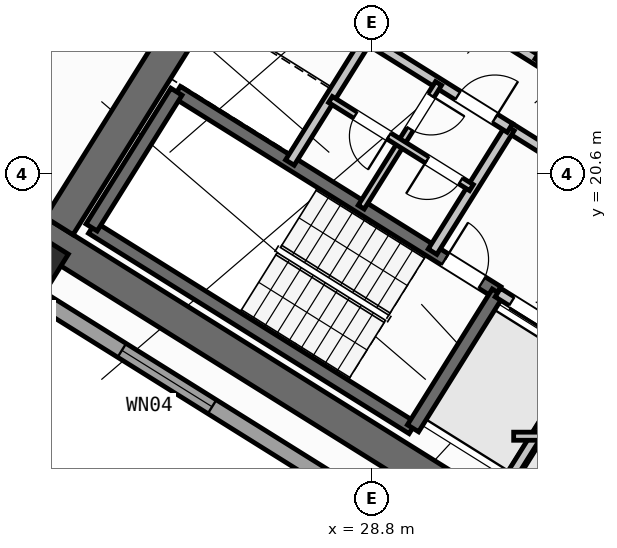
"""IFC4 building model, lengths in metres.
Left out: names, types, materials, properties, quantities, classifications, styles, units other than length and angle.
Written with IfcOpenShell. Run it as: python <this file> out.ifc"""

import sys

from ifc_helpers import new_model, si_unit, direction, frame, frame_2d, origin, origin_2d, place, context, subcontext, project, spatial, rectangle, hollow_rectangle, extrude, source, transform, mapped, element, fill, save


model = new_model("IFC4")
c1 = context("Model", 3, precision=1e-05, world=origin(), true_north=direction((0.0, 1.0)))
c2 = subcontext(c1, "Body", "Model", "MODEL_VIEW")
j1 = project(units=[si_unit("LENGTHUNIT", "METRE"), si_unit("PLANEANGLEUNIT", "RADIAN")], contexts=[c1])
p1 = place(None, origin())
s1 = spatial("IfcSite", under=j1, at=p1, CompositionType="ELEMENT")
p2 = place(p1, origin())
s2 = spatial("IfcBuilding", under=s1, at=p2, CompositionType="ELEMENT")
p3 = place(p2, frame((0.0, 0.0, 97.2)))
s3 = spatial("IfcBuildingStorey", under=s2, at=p3, CompositionType="ELEMENT", Elevation=97.2)
p4 = place(p3, frame((33.409, 12.45, 0.0), z_axis=(0.0, 0.0, 1.0), x_axis=(-0.848051132073, 0.529914405721, 0.0)))
e1 = element("IfcWall", 1, at=p4, inside=s3, PredefinedType="SHEAR", context=c2, shape_type="SweptSolid", body=[
    extrude(rectangle(XDim=13.24, YDim=0.65, at=frame_2d((6.62, 0.0))), origin(), (0.0, 0.0, 1.0), 3.32),
])
p5 = place(p3, frame((26.007, 24.976, 0.0), z_axis=(0.0, 0.0, 1.0), x_axis=(-0.529916319127, -0.848049936456, 0.0)))
e2 = element("IfcWall", 2, at=p5, inside=s3, PredefinedType="SHEAR", context=c2, shape_type="SweptSolid", body=[
    extrude(rectangle(XDim=6.375, YDim=0.65, at=frame_2d((3.188, 0.0))), origin(), (0.0, 0.0, 1.0), 3.32),
])
m1 = source(origin(), c2, "Body", "SweptSolid", [
    extrude(hollow_rectangle(XDim=0.9, YDim=0.9, WallThickness=0.036, at=origin_2d()), origin(), (0.0, 0.0, 1.0), 3.6),
])
p6 = place(p3, frame((22.191, 18.87, 0.0), z_axis=(0.0, 0.0, 1.0), x_axis=(-0.848048096156, 0.529919264233, 0.0)))
e3 = element("IfcColumn", 3, at=p6, inside=s3, PredefinedType="COLUMN", context=c2, shape_type="MappedRepresentation", body=[
    mapped(m1, transform((0.0, 0.0, 0.0), scale=1.0)),
])
p7 = place(p3, frame((31.76, 12.183, 0.0), z_axis=(0.0, 0.0, 1.0), x_axis=(-0.848047074256, 0.529920899612, 0.0)))
e4 = element("IfcWall", 4, at=p7, inside=s3, PredefinedType="STANDARD", context=c2, shape_type="SweptSolid", body=[
    extrude(rectangle(XDim=30.652, YDim=0.32, at=frame_2d((15.326, 0.0))), origin(), (0.0, 0.0, 1.0), 3.32),
])
p8 = place(p7, frame((15.153, 0.0, 0.0)))
e5 = element("IfcOpeningElement", 5, at=p8, cuts=e4, PredefinedType="OPENING", context=c2, shape_type="SweptSolid", body=[
    extrude(rectangle(XDim=1.2, YDim=2.15, at=frame_2d((0.6, 1.075))), frame((0.0, 0.17, 0.0), z_axis=(0.0, -1.0, 0.0), x_axis=(1.0, 0.0, 0.0)), (0.0, 0.0, 1.0), 0.34),
])
p9 = place(p7, frame((2.002, 0.0, 0.8)))
e6 = element("IfcOpeningElement", 6, at=p9, cuts=e4, PredefinedType="OPENING", context=c2, shape_type="SweptSolid", body=[
    extrude(rectangle(XDim=2.1, YDim=1.55, at=frame_2d((1.05, 0.775))), frame((0.0, 0.17, 0.0), z_axis=(0.0, -1.0, 0.0), x_axis=(1.0, 0.0, 0.0)), (0.0, 0.0, 1.0), 0.34),
])
p10 = place(p7, frame((7.206, 0.0, 0.8)))
e7 = element("IfcOpeningElement", 7, at=p10, cuts=e4, PredefinedType="OPENING", context=c2, shape_type="SweptSolid", body=[
    extrude(rectangle(XDim=2.1, YDim=1.55, at=frame_2d((1.05, 0.775))), frame((0.0, 0.17, 0.0), z_axis=(0.0, -1.0, 0.0), x_axis=(1.0, 0.0, 0.0)), (0.0, 0.0, 1.0), 0.34),
])
p11 = place(p7, frame((12.648, 0.0, 1.0)))
e8 = element("IfcOpeningElement", 8, at=p11, cuts=e4, PredefinedType="OPENING", context=c2, shape_type="SweptSolid", body=[
    extrude(rectangle(XDim=0.9, YDim=1.25, at=frame_2d((0.45, 0.625))), frame((0.0, 0.17, 0.0), z_axis=(0.0, -1.0, 0.0), x_axis=(1.0, 0.0, 0.0)), (0.0, 0.0, 1.0), 0.34),
])
p12 = place(p7, frame((27.974, 0.0, 0.95)))
e9 = element("IfcOpeningElement", 9, at=p12, cuts=e4, PredefinedType="OPENING", context=c2, shape_type="SweptSolid", body=[
    extrude(rectangle(XDim=1.2, YDim=1.4, at=frame_2d((0.6, 0.7))), frame((0.0, 0.17, 0.0), z_axis=(0.0, -1.0, 0.0), x_axis=(1.0, 0.0, 0.0)), (0.0, 0.0, 1.0), 0.34),
])
p13 = place(p7, frame((18.347, 0.0, 1.0)))
e10 = element("IfcOpeningElement", 10, at=p13, cuts=e4, PredefinedType="OPENING", context=c2, shape_type="SweptSolid", body=[
    extrude(rectangle(XDim=0.9, YDim=1.25, at=frame_2d((0.45, 0.625))), frame((0.0, 0.17, 0.0), z_axis=(0.0, -1.0, 0.0), x_axis=(1.0, 0.0, 0.0)), (0.0, 0.0, 1.0), 0.34),
])
p14 = place(p7, frame((20.931, 0.0, 1.0)))
e11 = element("IfcOpeningElement", 11, at=p14, cuts=e4, PredefinedType="OPENING", context=c2, shape_type="SweptSolid", body=[
    extrude(rectangle(XDim=0.65, YDim=1.15, at=frame_2d((0.325, 0.575))), frame((0.0, 0.17, 0.0), z_axis=(0.0, -1.0, 0.0), x_axis=(1.0, 0.0, 0.0)), (0.0, 0.0, 1.0), 0.34),
])
p15 = place(p7, frame((22.938, 0.0, 1.0)))
e12 = element("IfcOpeningElement", 12, at=p15, cuts=e4, PredefinedType="OPENING", context=c2, shape_type="SweptSolid", body=[
    extrude(rectangle(XDim=0.9, YDim=1.25, at=frame_2d((0.45, 0.625))), frame((0.0, 0.17, 0.0), z_axis=(0.0, -1.0, 0.0), x_axis=(1.0, 0.0, 0.0)), (0.0, 0.0, 1.0), 0.34),
])
p16 = place(p7, frame((25.069, 0.0, 1.0)))
e13 = element("IfcOpeningElement", 13, at=p16, cuts=e4, PredefinedType="OPENING", context=c2, shape_type="SweptSolid", body=[
    extrude(rectangle(XDim=0.9, YDim=1.25, at=frame_2d((0.45, 0.625))), frame((0.0, 0.17, 0.0), z_axis=(0.0, -1.0, 0.0), x_axis=(1.0, 0.0, 0.0)), (0.0, 0.0, 1.0), 0.34),
])
p17 = place(p3, frame((29.605, 15.581, 0.0), z_axis=(0.0, 0.0, 1.0), x_axis=(-0.848036911448, 0.529937163087, 0.0)))
e14 = element("IfcWall", 14, at=p17, inside=s3, PredefinedType="SHEAR", context=c2, shape_type="SweptSolid", body=[
    extrude(rectangle(XDim=7.46, YDim=0.26, at=frame_2d((3.73, 0.0))), origin(), (0.0, 0.0, 1.0), 3.32),
])
p18 = place(p3, frame((31.28, 18.261, 0.0), z_axis=(0.0, 0.0, 1.0), x_axis=(-0.848051618787, 0.529913626805, 0.0)))
e15 = element("IfcWall", 15, at=p18, inside=s3, PredefinedType="SHEAR", context=c2, shape_type="SweptSolid", body=[
    extrude(rectangle(XDim=7.46, YDim=0.26, at=frame_2d((3.73, 0.0))), origin(), (0.0, 0.0, 1.0), 3.32),
])
p19 = place(p18, frame((0.36, 0.0, 0.0)))
e16 = element("IfcOpeningElement", 16, at=p19, cuts=e15, PredefinedType="OPENING", context=c2, shape_type="SweptSolid", body=[
    extrude(rectangle(XDim=0.86, YDim=2.05, at=frame_2d((0.43, 1.025))), frame((0.0, 0.14, 0.0), z_axis=(0.0, -1.0, 0.0), x_axis=(1.0, 0.0, 0.0)), (0.0, 0.0, 1.0), 0.28),
])
p20 = place(p3, frame((31.288, 18.256, 0.0), z_axis=(0.0, 0.0, 1.0), x_axis=(-0.529943379326, -0.848033026897, 0.0)))
e17 = element("IfcWall", 17, at=p20, inside=s3, PredefinedType="SHEAR", context=c2, shape_type="SweptSolid", body=[
    extrude(rectangle(XDim=3.16, YDim=0.26, at=frame_2d((1.58, 0.0))), origin(), (0.0, 0.0, 1.0), 3.32),
])
p21 = place(p3, frame((24.945, 22.22, 0.0), z_axis=(0.0, 0.0, 1.0), x_axis=(-0.529908658664, -0.84805472316, 0.0)))
e18 = element("IfcWall", 18, at=p21, inside=s3, PredefinedType="SHEAR", context=c2, shape_type="SweptSolid", body=[
    extrude(rectangle(XDim=3.16, YDim=0.26, at=frame_2d((1.58, 0.0))), origin(), (0.0, 0.0, 1.0), 3.32),
])
p22 = place(p3, frame((38.046, 21.108, 0.0), z_axis=(0.0, 0.0, 1.0), x_axis=(-0.848054434086, 0.529909121291, 0.0)))
e19 = element("IfcWall", 19, at=p22, inside=s3, PredefinedType="SHEAR", context=c2, shape_type="SweptSolid", body=[
    extrude(rectangle(XDim=7.33, YDim=0.26, at=frame_2d((3.665, 0.0))), origin(), (0.0, 0.0, 1.0), 3.32),
])
p23 = place(p22, frame((0.22, 0.0, 0.0)))
e20 = element("IfcOpeningElement", 20, at=p23, cuts=e19, PredefinedType="OPENING", context=c2, shape_type="SweptSolid", body=[
    extrude(rectangle(XDim=1.1, YDim=2.1, at=frame_2d((0.55, 1.05))), frame((0.0, 0.14, 0.0), z_axis=(0.0, -1.0, 0.0), x_axis=(1.0, 0.0, 0.0)), (0.0, 0.0, 1.0), 0.28),
])
p24 = place(p3, frame((34.848, 16.031, 0.0), z_axis=(0.0, 0.0, 1.0), x_axis=(-0.848044042236, 0.529925751807, 0.0)))
e21 = element("IfcWall", 21, at=p24, inside=s3, PredefinedType="STANDARD", context=c2, shape_type="SweptSolid", body=[
    extrude(rectangle(XDim=4.198, YDim=0.2, at=frame_2d((2.099, 0.0))), origin(), (0.0, 0.0, 1.0), 3.31),
])
p25 = place(p24, frame((0.348, 0.0, 0.0)))
e22 = element("IfcOpeningElement", 22, at=p25, cuts=e21, PredefinedType="OPENING", context=c2, shape_type="SweptSolid", body=[
    extrude(rectangle(XDim=1.3, YDim=2.2, at=frame_2d((0.65, 1.1))), frame((0.0, 0.11, 0.0), z_axis=(0.0, -1.0, 0.0), x_axis=(1.0, 0.0, 0.0)), (0.0, 0.0, 1.0), 0.22),
])
p26 = place(p24, frame((2.423, 0.0, 0.0)))
e23 = element("IfcOpeningElement", 23, at=p26, cuts=e21, PredefinedType="OPENING", context=c2, shape_type="SweptSolid", body=[
    extrude(rectangle(XDim=1.45, YDim=2.25, at=frame_2d((0.725, 1.125))), frame((0.0, 0.11, 0.0), z_axis=(0.0, -1.0, 0.0), x_axis=(1.0, 0.0, 0.0)), (0.0, 0.0, 1.0), 0.22),
])
p27 = place(p3, frame((36.374, 18.474, 0.0), z_axis=(0.0, 0.0, 1.0), x_axis=(-0.848051071577, 0.529914502535, 0.0)))
e24 = element("IfcWall", 24, at=p27, inside=s3, PredefinedType="STANDARD", context=c2, shape_type="SweptSolid", body=[
    extrude(rectangle(XDim=5.718, YDim=0.2, at=frame_2d((2.859, 0.0))), origin(), (0.0, 0.0, 1.0), 3.31),
])
p28 = place(p27, frame((2.498, 0.0, 0.0)))
e25 = element("IfcOpeningElement", 25, at=p28, cuts=e24, PredefinedType="OPENING", context=c2, shape_type="SweptSolid", body=[
    extrude(rectangle(XDim=1.15, YDim=2.1, at=frame_2d((0.575, 1.05))), frame((0.0, 0.11, 0.0), z_axis=(0.0, -1.0, 0.0), x_axis=(1.0, 0.0, 0.0)), (0.0, 0.0, 1.0), 0.22),
])
p29 = place(p3, frame((32.108, 22.814, 0.0), z_axis=(0.0, 0.0, 1.0), x_axis=(-0.848042229521, 0.529928652696, 0.0)))
e26 = element("IfcWall", 26, at=p29, inside=s3, PredefinedType="STANDARD", context=c2, shape_type="SweptSolid", body=[
    extrude(rectangle(XDim=5.62, YDim=0.2, at=frame_2d((2.81, 0.0))), origin(), (0.0, 0.0, 1.0), 3.31),
])
p30 = place(p3, frame((32.982, 24.213, 0.0), z_axis=(0.0, 0.0, 1.0), x_axis=(-0.529839334948, -0.84809803628, 0.0)))
e27 = element("IfcWall", 27, at=p30, inside=s3, PredefinedType="STANDARD", context=c2, shape_type="SweptSolid", body=[
    extrude(rectangle(XDim=1.65, YDim=0.2, at=frame_2d((0.825, 0.0))), origin(), (0.0, 0.0, 1.0), 3.31),
])
p31 = place(p3, frame((33.029, 17.003, 0.0), z_axis=(0.0, 0.0, 1.0), x_axis=(-0.529916267533, -0.848049968695, 0.0)))
e28 = element("IfcWall", 28, at=p31, inside=s3, PredefinedType="STANDARD", context=c2, shape_type="SweptSolid", body=[
    extrude(rectangle(XDim=2.92, YDim=0.2, at=frame_2d((1.46, 0.0))), origin(), (0.0, 0.0, 1.0), 3.31),
])
for number, where, z_axis, x_axis in (
    (29, (31.525, 21.504, 0.0), (0.0, 0.0, 1.0), (-0.53, -0.848, 0.0)),
    (30, (28.71, 23.263, 0.0), (0.0, 0.0, 1.0), (-0.53, -0.848, 0.0)),
):
    element("IfcWall", number, at=place(p3, frame(where, z_axis=z_axis, x_axis=x_axis)), inside=s3, PredefinedType="STANDARD", context=c2, shape_type="SweptSolid", body=[
        extrude(rectangle(XDim=2.88, YDim=0.2, at=frame_2d((1.44, 0.0))), origin(), (0.0, 0.0, 1.0), 3.31),
    ])
p32 = place(p3, frame((31.525, 21.504, 0.0), z_axis=(0.0, 0.0, 1.0), x_axis=(-0.848044998614, 0.529924221305, 0.0)))
e31 = element("IfcWall", 31, at=p32, inside=s3, PredefinedType="STANDARD", context=c2, shape_type="SweptSolid", body=[
    extrude(rectangle(XDim=6.168, YDim=0.2, at=frame_2d((3.084, 0.0))), origin(), (0.0, 0.0, 1.0), 3.31),
])
p33 = place(p32, frame((4.4, 0.0, 0.0)))
e32 = element("IfcOpeningElement", 32, at=p33, cuts=e31, PredefinedType="OPENING", context=c2, shape_type="SweptSolid", body=[
    extrude(rectangle(XDim=0.86, YDim=2.05, at=frame_2d((0.43, 1.025))), frame((0.0, 0.11, 0.0), z_axis=(0.0, -1.0, 0.0), x_axis=(1.0, 0.0, 0.0)), (0.0, 0.0, 1.0), 0.22),
])
p34 = place(p32, frame((0.35, 0.0, 0.0)))
e33 = element("IfcOpeningElement", 33, at=p34, cuts=e31, PredefinedType="OPENING", context=c2, shape_type="SweptSolid", body=[
    extrude(rectangle(XDim=0.86, YDim=2.05, at=frame_2d((0.43, 1.025))), frame((0.0, 0.11, 0.0), z_axis=(0.0, -1.0, 0.0), x_axis=(1.0, 0.0, 0.0)), (0.0, 0.0, 1.0), 0.22),
])
p35 = place(p3, frame((30.117, 22.384, 0.0), z_axis=(0.0, 0.0, 1.0), x_axis=(-0.529951914384, -0.848027693204, 0.0)))
e34 = element("IfcWall", 34, at=p35, inside=s3, PredefinedType="PLUMBINGWALL", context=c2, shape_type="SweptSolid", body=[
    extrude(rectangle(XDim=1.4, YDim=0.14, at=frame_2d((0.7, 0.0))), origin(), (0.0, 0.0, 1.0), 3.31),
])
p36 = place(p35, frame((0.28, 0.0, 0.0)))
e35 = element("IfcOpeningElement", 35, at=p36, cuts=e34, PredefinedType="OPENING", context=c2, shape_type="SweptSolid", body=[
    extrude(rectangle(XDim=0.78, YDim=2.05, at=frame_2d((0.39, 1.025))), frame((0.0, 0.08, 0.0), z_axis=(0.0, -1.0, 0.0), x_axis=(1.0, 0.0, 0.0)), (0.0, 0.0, 1.0), 0.16),
])
p37 = place(p3, frame((29.375, 21.196, 0.0), z_axis=(0.0, 0.0, 1.0), x_axis=(-0.529865479138, -0.848081702443, 0.0)))
e36 = element("IfcWall", 36, at=p37, inside=s3, PredefinedType="PLUMBINGWALL", context=c2, shape_type="SweptSolid", body=[
    extrude(rectangle(XDim=1.48, YDim=0.14, at=frame_2d((0.74, 0.0))), origin(), (0.0, 0.0, 1.0), 3.31),
])
p38 = place(p3, frame((30.766, 20.327, 0.0), z_axis=(0.0, 0.0, 1.0), x_axis=(-0.848052663127, 0.529911955482, 0.0)))
e37 = element("IfcWall", 37, at=p38, inside=s3, PredefinedType="PLUMBINGWALL", context=c2, shape_type="SweptSolid", body=[
    extrude(rectangle(XDim=3.28, YDim=0.14, at=frame_2d((1.64, 0.0))), origin(), (0.0, 0.0, 1.0), 3.31),
])
p39 = place(p38, frame((0.25, 0.0, 0.0)))
e38 = element("IfcOpeningElement", 38, at=p39, cuts=e37, PredefinedType="OPENING", context=c2, shape_type="SweptSolid", body=[
    extrude(rectangle(XDim=0.78, YDim=2.05, at=frame_2d((0.39, 1.025))), frame((0.0, 0.08, 0.0), z_axis=(0.0, -1.0, 0.0), x_axis=(1.0, 0.0, 0.0)), (0.0, 0.0, 1.0), 0.16),
])
p40 = place(p38, frame((1.92, 0.0, 0.0)))
e39 = element("IfcOpeningElement", 39, at=p40, cuts=e37, PredefinedType="OPENING", context=c2, shape_type="SweptSolid", body=[
    extrude(rectangle(XDim=0.78, YDim=2.05, at=frame_2d((0.39, 1.025))), frame((0.0, 0.08, 0.0), z_axis=(0.0, -1.0, 0.0), x_axis=(1.0, 0.0, 0.0)), (0.0, 0.0, 1.0), 0.16),
])
p41 = place(p3, frame((25.807, 29.582, 0.0), z_axis=(0.0, 0.0, 1.0), x_axis=(-0.529920357077, -0.848047413271, 0.0)))
e40 = element("IfcWall", 40, at=p41, inside=s3, PredefinedType="PARTITIONING", context=c2, shape_type="SweptSolid", body=[
    extrude(rectangle(XDim=11.45, YDim=0.16, at=frame_2d((5.725, 0.0))), origin(), (0.0, 0.0, 1.0), 3.31),
])
p42 = place(p3, frame((31.6, 15.42, 0.0), z_axis=(0.0, 0.0, 1.0), x_axis=(1.0, 0.0, 0.0)))
e41 = element("IfcWall", 41, at=p42, inside=s3, PredefinedType="PARTITIONING", context=c2, shape_type="SweptSolid", body=[
    extrude(rectangle(XDim=2.866, YDim=0.16, at=frame_2d((1.433, 0.0))), origin(), (0.0, 0.0, 1.0), 3.31),
])
m2 = source(origin(), c2, "Body", "SweptSolid", [
    extrude(rectangle(XDim=2.1, YDim=1.55, at=frame_2d((1.05, 0.775))), frame((0.0, 0.03, 0.0), z_axis=(0.0, -1.0, 0.0), x_axis=(1.0, 0.0, 0.0)), (0.0, 0.0, 1.0), 0.06),
])
p43 = place(p10, origin())
e42 = element("IfcWindow", 42, at=p43, inside=s3, PartitioningType="SINGLE_PANEL", PredefinedType="WINDOW", context=c2, shape_type="MappedRepresentation", body=[
    mapped(m2, transform((0.0, 0.0, 0.0), scale=1.0)),
])
fill(e7, e42)
m3 = source(origin(), c2, "Body", "SweptSolid", [
    extrude(rectangle(XDim=0.86, YDim=2.05, at=frame_2d((0.43, 1.025))), frame((0.0, 0.025, 0.0), z_axis=(0.0, -1.0, 0.0), x_axis=(1.0, 0.0, 0.0)), (0.0, 0.0, 1.0), 0.05),
])
p44 = place(p19, frame((0.86, 0.0, 0.0), z_axis=(0.0, 0.0, 1.0), x_axis=(-1.0, 0.0, 0.0)))
e43 = element("IfcDoor", 43, at=p44, inside=s3, OperationType="SINGLE_SWING_LEFT", PredefinedType="DOOR", context=c2, shape_type="MappedRepresentation", body=[
    mapped(m3, transform((0.0, 0.0, 0.0), scale=1.0)),
])
fill(e16, e43)
m4 = source(origin(), c2, "Body", "SweptSolid", [
    extrude(rectangle(XDim=1.45, YDim=2.25, at=frame_2d((0.725, 1.125))), frame((0.0, 0.025, 0.0), z_axis=(0.0, -1.0, 0.0), x_axis=(1.0, 0.0, 0.0)), (0.0, 0.0, 1.0), 0.05),
])
p45 = place(p26, origin())
e44 = element("IfcDoor", 44, at=p45, inside=s3, OperationType="DOUBLE_DOOR_SLIDING", PredefinedType="DOOR", context=c2, shape_type="MappedRepresentation", body=[
    mapped(m4, transform((0.0, 0.0, 0.0), scale=1.0)),
])
fill(e23, e44)
p46 = place(p34, frame((0.86, 0.0, 0.0), z_axis=(0.0, 0.0, 1.0), x_axis=(-1.0, 0.0, 0.0)))
e45 = element("IfcDoor", 45, at=p46, inside=s3, OperationType="SINGLE_SWING_RIGHT", PredefinedType="DOOR", context=c2, shape_type="MappedRepresentation", body=[
    mapped(m3, transform((0.0, 0.0, 0.0), scale=1.0)),
])
fill(e33, e45)
m5 = source(origin(), c2, "Body", "SweptSolid", [
    extrude(rectangle(XDim=0.78, YDim=2.05, at=frame_2d((0.39, 1.025))), frame((0.0, 0.025, 0.0), z_axis=(0.0, -1.0, 0.0), x_axis=(1.0, 0.0, 0.0)), (0.0, 0.0, 1.0), 0.05),
])
p47 = place(p36, origin())
e46 = element("IfcDoor", 46, at=p47, inside=s3, OperationType="SINGLE_SWING_LEFT", PredefinedType="DOOR", context=c2, shape_type="MappedRepresentation", body=[
    mapped(m5, transform((0.0, 0.0, 0.0), scale=1.0)),
])
fill(e35, e46)
p48 = place(p39, origin())
e47 = element("IfcDoor", 47, at=p48, inside=s3, OperationType="SINGLE_SWING_RIGHT", PredefinedType="DOOR", context=c2, shape_type="MappedRepresentation", body=[
    mapped(m5, transform((0.0, 0.0, 0.0), scale=1.0)),
])
fill(e38, e47)
p49 = place(p40, origin())
e48 = element("IfcDoor", 48, at=p49, inside=s3, OperationType="SINGLE_SWING_LEFT", PredefinedType="DOOR", context=c2, shape_type="MappedRepresentation", body=[
    mapped(m5, transform((0.0, 0.0, 0.0), scale=1.0)),
])
fill(e39, e48)
save(model, sys.argv[1])
